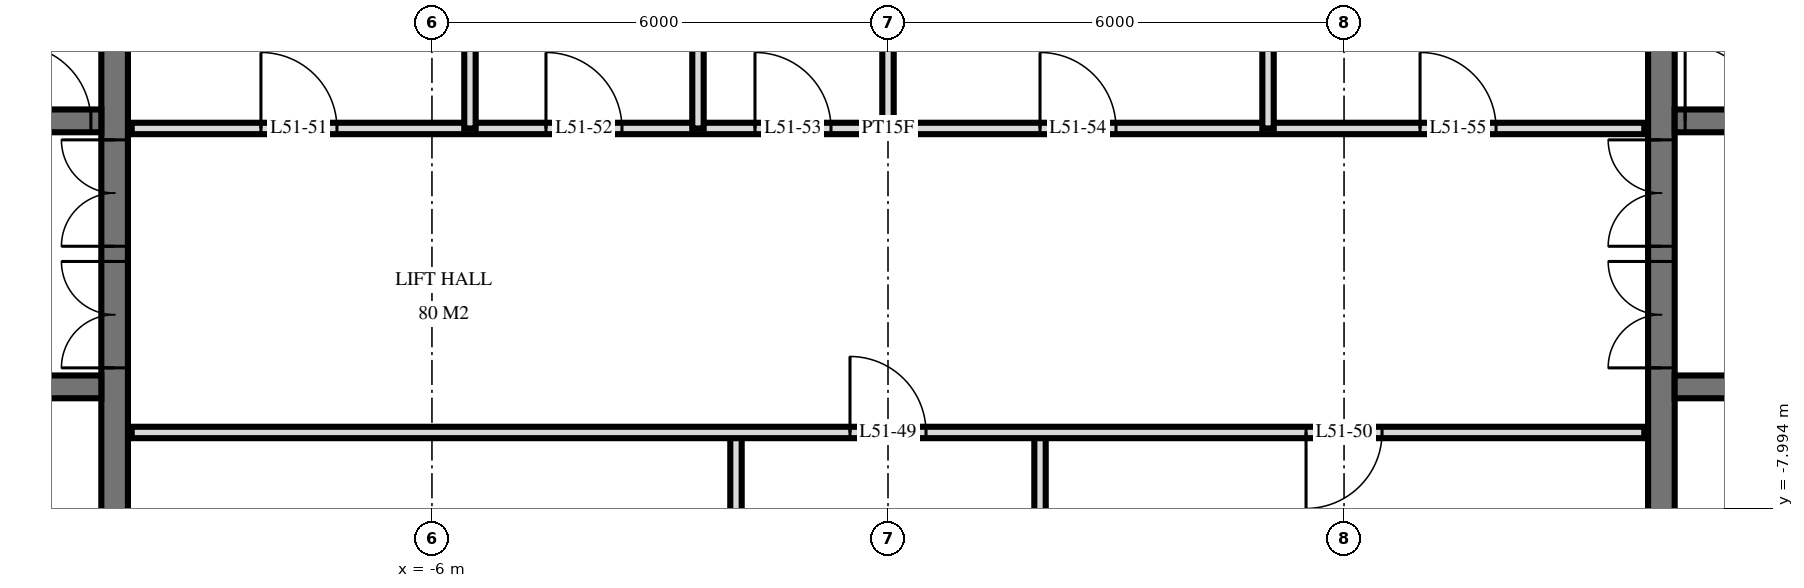
"""IFC4 building model, lengths in metres.
Left out: names, types, materials, properties, quantities, classifications, styles, units other than length and angle.
Written with IfcOpenShell. Run it as: python <this file> out.ifc"""

import sys

from ifc_helpers import new_model, si_unit, direction, frame, frame_2d, origin, place, context, subcontext, project, spatial, rectangle, extrude, element, fill, save


model = new_model("IFC4")
c1 = context("Model", 3, precision=1e-05, world=origin(), true_north=direction((0.0, 1.0)))
c2 = subcontext(c1, "Body", "Model", "MODEL_VIEW")
j1 = project(units=[si_unit("LENGTHUNIT", "METRE"), si_unit("PLANEANGLEUNIT", "RADIAN")], contexts=[c1])
p1 = place(None, origin())
s1 = spatial("IfcSite", under=j1, at=p1, CompositionType="ELEMENT")
p2 = place(p1, origin())
s2 = spatial("IfcBuilding", under=s1, at=p2, CompositionType="ELEMENT")
p3 = place(p2, frame((0.0, 0.0, 197.6)))
s3 = spatial("IfcBuildingStorey", under=s2, at=p3, CompositionType="ELEMENT", Elevation=197.6)
p4 = place(p3, frame((-10.175, -14.55, 0.0), z_axis=(0.0, 0.0, 1.0), x_axis=(0.0, 1.0, 0.0)))
e1 = element("IfcWall", 1, at=p4, inside=s3, PredefinedType="SHEAR", context=c2, shape_type="SweptSolid", body=[
    extrude(rectangle(XDim=14.1, YDim=0.35, at=frame_2d((7.05, 0.0))), origin(), (0.0, 0.0, 1.0), 3.5),
])
p5 = place(p4, frame((8.4, 0.0, 0.0)))
e2 = element("IfcOpeningElement", 2, at=p5, cuts=e1, PredefinedType="OPENING", context=c2, shape_type="SweptSolid", body=[
    extrude(rectangle(XDim=1.4, YDim=2.4, at=frame_2d((0.7, 1.2))), frame((0.0, 0.185, 0.0), z_axis=(0.0, -1.0, 0.0), x_axis=(1.0, 0.0, 0.0)), (0.0, 0.0, 1.0), 0.37),
])
p6 = place(p4, frame((10.0, 0.0, 0.0)))
e3 = element("IfcOpeningElement", 3, at=p6, cuts=e1, PredefinedType="OPENING", context=c2, shape_type="SweptSolid", body=[
    extrude(rectangle(XDim=1.4, YDim=2.4, at=frame_2d((0.7, 1.2))), frame((0.0, 0.185, 0.0), z_axis=(0.0, -1.0, 0.0), x_axis=(1.0, 0.0, 0.0)), (0.0, 0.0, 1.0), 0.37),
])
p7 = place(p4, frame((4.0, 0.0, 0.0)))
e4 = element("IfcOpeningElement", 4, at=p7, cuts=e1, PredefinedType="OPENING", context=c2, shape_type="SweptSolid", body=[
    extrude(rectangle(XDim=1.2, YDim=2.1, at=frame_2d((0.6, 1.05))), frame((0.0, 0.185, 0.0), z_axis=(0.0, -1.0, 0.0), x_axis=(1.0, 0.0, 0.0)), (0.0, 0.0, 1.0), 0.37),
])
p8 = place(p3, frame((-24.05, -2.9, 0.0), z_axis=(0.0, 0.0, 1.0), x_axis=(1.0, 0.0, 0.0)))
e5 = element("IfcWall", 5, at=p8, inside=s3, PredefinedType="SHEAR", context=c2, shape_type="SweptSolid", body=[
    extrude(rectangle(XDim=13.7, YDim=0.3, at=frame_2d((6.85, 0.0))), origin(), (0.0, 0.0, 1.0), 3.5),
])
p9 = place(p8, frame((0.55, 0.0, 0.0)))
e6 = element("IfcOpeningElement", 6, at=p9, cuts=e5, PredefinedType="OPENING", context=c2, shape_type="SweptSolid", body=[
    extrude(rectangle(XDim=1.1, YDim=2.1, at=frame_2d((0.55, 1.05))), frame((0.0, 0.16, 0.0), z_axis=(0.0, -1.0, 0.0), x_axis=(1.0, 0.0, 0.0)), (0.0, 0.0, 1.0), 0.32),
])
p10 = place(p8, frame((6.613, 0.0, 0.0)))
e7 = element("IfcOpeningElement", 7, at=p10, cuts=e5, PredefinedType="OPENING", context=c2, shape_type="SweptSolid", body=[
    extrude(rectangle(XDim=0.9, YDim=2.1, at=frame_2d((0.45, 1.05))), frame((0.0, 0.16, 0.0), z_axis=(0.0, -1.0, 0.0), x_axis=(1.0, 0.0, 0.0)), (0.0, 0.0, 1.0), 0.32),
])
p11 = place(p8, frame((5.188, 0.0, 0.0)))
e8 = element("IfcOpeningElement", 8, at=p11, cuts=e5, PredefinedType="OPENING", context=c2, shape_type="SweptSolid", body=[
    extrude(rectangle(XDim=0.9, YDim=2.1, at=frame_2d((0.45, 1.05))), frame((0.0, 0.16, 0.0), z_axis=(0.0, -1.0, 0.0), x_axis=(1.0, 0.0, 0.0)), (0.0, 0.0, 1.0), 0.32),
])
p12 = place(p8, frame((12.562, 0.0, 0.0)))
e9 = element("IfcOpeningElement", 9, at=p12, cuts=e5, PredefinedType="OPENING", context=c2, shape_type="SweptSolid", body=[
    extrude(rectangle(XDim=1.0, YDim=2.1, at=frame_2d((0.5, 1.05))), frame((0.0, 0.16, 0.0), z_axis=(0.0, -1.0, 0.0), x_axis=(1.0, 0.0, 0.0)), (0.0, 0.0, 1.0), 0.32),
])
p13 = place(p8, frame((11.137, 0.0, 0.0)))
e10 = element("IfcOpeningElement", 10, at=p13, cuts=e5, PredefinedType="OPENING", context=c2, shape_type="SweptSolid", body=[
    extrude(rectangle(XDim=1.0, YDim=2.1, at=frame_2d((0.5, 1.05))), frame((0.0, 0.16, 0.0), z_axis=(0.0, -1.0, 0.0), x_axis=(1.0, 0.0, 0.0)), (0.0, 0.0, 1.0), 0.32),
])
p14 = place(p8, frame((8.85, 0.0, 0.0)))
e11 = element("IfcOpeningElement", 11, at=p14, cuts=e5, PredefinedType="OPENING", context=c2, shape_type="SweptSolid", body=[
    extrude(rectangle(XDim=1.0, YDim=2.1, at=frame_2d((0.5, 1.05))), frame((0.0, 0.16, 0.0), z_axis=(0.0, -1.0, 0.0), x_axis=(1.0, 0.0, 0.0)), (0.0, 0.0, 1.0), 0.32),
])
p15 = place(p8, frame((3.0, 0.0, 0.0)))
e12 = element("IfcOpeningElement", 12, at=p15, cuts=e5, PredefinedType="OPENING", context=c2, shape_type="SweptSolid", body=[
    extrude(rectangle(XDim=1.0, YDim=2.1, at=frame_2d((0.5, 1.05))), frame((0.0, 0.16, 0.0), z_axis=(0.0, -1.0, 0.0), x_axis=(1.0, 0.0, 0.0)), (0.0, 0.0, 1.0), 0.32),
])
p16 = place(p3, frame((-24.05, -6.4, 0.0), z_axis=(0.0, 0.0, 1.0), x_axis=(1.0, 0.0, 0.0)))
e13 = element("IfcWall", 13, at=p16, inside=s3, PredefinedType="SHEAR", context=c2, shape_type="SweptSolid", body=[
    extrude(rectangle(XDim=13.7, YDim=0.3, at=frame_2d((6.85, 0.0))), origin(), (0.0, 0.0, 1.0), 3.5),
])
p17 = place(p16, frame((0.55, 0.0, 0.0)))
e14 = element("IfcOpeningElement", 14, at=p17, cuts=e13, PredefinedType="OPENING", context=c2, shape_type="SweptSolid", body=[
    extrude(rectangle(XDim=1.1, YDim=2.1, at=frame_2d((0.55, 1.05))), frame((0.0, 0.16, 0.0), z_axis=(0.0, -1.0, 0.0), x_axis=(1.0, 0.0, 0.0)), (0.0, 0.0, 1.0), 0.32),
])
p18 = place(p16, frame((5.8, 0.0, 0.0)))
e15 = element("IfcOpeningElement", 15, at=p18, cuts=e13, PredefinedType="OPENING", context=c2, shape_type="SweptSolid", body=[
    extrude(rectangle(XDim=1.1, YDim=2.1, at=frame_2d((0.55, 1.05))), frame((0.0, 0.16, 0.0), z_axis=(0.0, -1.0, 0.0), x_axis=(1.0, 0.0, 0.0)), (0.0, 0.0, 1.0), 0.32),
])
p19 = place(p3, frame((10.175, -14.55, 0.0), z_axis=(0.0, 0.0, 1.0), x_axis=(0.0, 1.0, 0.0)))
e16 = element("IfcWall", 16, at=p19, inside=s3, PredefinedType="SHEAR", context=c2, shape_type="SweptSolid", body=[
    extrude(rectangle(XDim=14.1, YDim=0.35, at=frame_2d((7.05, 0.0))), origin(), (0.0, 0.0, 1.0), 3.5),
])
p20 = place(p19, frame((8.4, 0.0, 0.0)))
e17 = element("IfcOpeningElement", 17, at=p20, cuts=e16, PredefinedType="OPENING", context=c2, shape_type="SweptSolid", body=[
    extrude(rectangle(XDim=1.4, YDim=2.4, at=frame_2d((0.7, 1.2))), frame((0.0, 0.185, 0.0), z_axis=(0.0, -1.0, 0.0), x_axis=(1.0, 0.0, 0.0)), (0.0, 0.0, 1.0), 0.37),
])
p21 = place(p19, frame((10.0, 0.0, 0.0)))
e18 = element("IfcOpeningElement", 18, at=p21, cuts=e16, PredefinedType="OPENING", context=c2, shape_type="SweptSolid", body=[
    extrude(rectangle(XDim=1.4, YDim=2.4, at=frame_2d((0.7, 1.2))), frame((0.0, 0.185, 0.0), z_axis=(0.0, -1.0, 0.0), x_axis=(1.0, 0.0, 0.0)), (0.0, 0.0, 1.0), 0.37),
])
p22 = place(p19, frame((4.0, 0.0, 0.0)))
e19 = element("IfcOpeningElement", 19, at=p22, cuts=e16, PredefinedType="OPENING", context=c2, shape_type="SweptSolid", body=[
    extrude(rectangle(XDim=1.2, YDim=2.1, at=frame_2d((0.6, 1.05))), frame((0.0, 0.185, 0.0), z_axis=(0.0, -1.0, 0.0), x_axis=(1.0, 0.0, 0.0)), (0.0, 0.0, 1.0), 0.37),
])
p23 = place(p3, frame((10.35, -2.9, 0.0), z_axis=(0.0, 0.0, 1.0), x_axis=(1.0, 0.0, 0.0)))
e20 = element("IfcWall", 20, at=p23, inside=s3, PredefinedType="SHEAR", context=c2, shape_type="SweptSolid", body=[
    extrude(rectangle(XDim=13.7, YDim=0.3, at=frame_2d((6.85, 0.0))), origin(), (0.0, 0.0, 1.0), 3.5),
])
p24 = place(p23, frame((12.05, 0.0, 0.0)))
e21 = element("IfcOpeningElement", 21, at=p24, cuts=e20, PredefinedType="OPENING", context=c2, shape_type="SweptSolid", body=[
    extrude(rectangle(XDim=1.1, YDim=2.1, at=frame_2d((0.55, 1.05))), frame((0.0, 0.16, 0.0), z_axis=(0.0, -1.0, 0.0), x_axis=(1.0, 0.0, 0.0)), (0.0, 0.0, 1.0), 0.32),
])
p25 = place(p23, frame((6.188, 0.0, 0.0)))
e22 = element("IfcOpeningElement", 22, at=p25, cuts=e20, PredefinedType="OPENING", context=c2, shape_type="SweptSolid", body=[
    extrude(rectangle(XDim=0.9, YDim=2.1, at=frame_2d((0.45, 1.05))), frame((0.0, 0.16, 0.0), z_axis=(0.0, -1.0, 0.0), x_axis=(1.0, 0.0, 0.0)), (0.0, 0.0, 1.0), 0.32),
])
p26 = place(p23, frame((7.613, 0.0, 0.0)))
e23 = element("IfcOpeningElement", 23, at=p26, cuts=e20, PredefinedType="OPENING", context=c2, shape_type="SweptSolid", body=[
    extrude(rectangle(XDim=0.9, YDim=2.1, at=frame_2d((0.45, 1.05))), frame((0.0, 0.16, 0.0), z_axis=(0.0, -1.0, 0.0), x_axis=(1.0, 0.0, 0.0)), (0.0, 0.0, 1.0), 0.32),
])
p27 = place(p23, frame((0.137, 0.0, 0.0)))
e24 = element("IfcOpeningElement", 24, at=p27, cuts=e20, PredefinedType="OPENING", context=c2, shape_type="SweptSolid", body=[
    extrude(rectangle(XDim=1.0, YDim=2.1, at=frame_2d((0.5, 1.05))), frame((0.0, 0.16, 0.0), z_axis=(0.0, -1.0, 0.0), x_axis=(1.0, 0.0, 0.0)), (0.0, 0.0, 1.0), 0.32),
])
p28 = place(p23, frame((1.562, 0.0, 0.0)))
e25 = element("IfcOpeningElement", 25, at=p28, cuts=e20, PredefinedType="OPENING", context=c2, shape_type="SweptSolid", body=[
    extrude(rectangle(XDim=1.0, YDim=2.1, at=frame_2d((0.5, 1.05))), frame((0.0, 0.16, 0.0), z_axis=(0.0, -1.0, 0.0), x_axis=(1.0, 0.0, 0.0)), (0.0, 0.0, 1.0), 0.32),
])
p29 = place(p23, frame((3.85, 0.0, 0.0)))
e26 = element("IfcOpeningElement", 26, at=p29, cuts=e20, PredefinedType="OPENING", context=c2, shape_type="SweptSolid", body=[
    extrude(rectangle(XDim=1.0, YDim=2.1, at=frame_2d((0.5, 1.05))), frame((0.0, 0.16, 0.0), z_axis=(0.0, -1.0, 0.0), x_axis=(1.0, 0.0, 0.0)), (0.0, 0.0, 1.0), 0.32),
])
p30 = place(p23, frame((9.7, 0.0, 0.0)))
e27 = element("IfcOpeningElement", 27, at=p30, cuts=e20, PredefinedType="OPENING", context=c2, shape_type="SweptSolid", body=[
    extrude(rectangle(XDim=1.0, YDim=2.1, at=frame_2d((0.5, 1.05))), frame((0.0, 0.16, 0.0), z_axis=(0.0, -1.0, 0.0), x_axis=(1.0, 0.0, 0.0)), (0.0, 0.0, 1.0), 0.32),
])
p31 = place(p3, frame((10.35, -6.4, 0.0), z_axis=(0.0, 0.0, 1.0), x_axis=(1.0, 0.0, 0.0)))
e28 = element("IfcWall", 28, at=p31, inside=s3, PredefinedType="SHEAR", context=c2, shape_type="SweptSolid", body=[
    extrude(rectangle(XDim=13.7, YDim=0.3, at=frame_2d((6.85, 0.0))), origin(), (0.0, 0.0, 1.0), 3.5),
])
p32 = place(p31, frame((12.05, 0.0, 0.0)))
e29 = element("IfcOpeningElement", 29, at=p32, cuts=e28, PredefinedType="OPENING", context=c2, shape_type="SweptSolid", body=[
    extrude(rectangle(XDim=1.1, YDim=2.1, at=frame_2d((0.55, 1.05))), frame((0.0, 0.16, 0.0), z_axis=(0.0, -1.0, 0.0), x_axis=(1.0, 0.0, 0.0)), (0.0, 0.0, 1.0), 0.32),
])
p33 = place(p31, frame((6.8, 0.0, 0.0)))
e30 = element("IfcOpeningElement", 30, at=p33, cuts=e28, PredefinedType="OPENING", context=c2, shape_type="SweptSolid", body=[
    extrude(rectangle(XDim=1.1, YDim=2.1, at=frame_2d((0.55, 1.05))), frame((0.0, 0.16, 0.0), z_axis=(0.0, -1.0, 0.0), x_axis=(1.0, 0.0, 0.0)), (0.0, 0.0, 1.0), 0.32),
])
p34 = place(p3, frame((5.0, -3.0, 0.0), z_axis=(0.0, 0.0, 1.0), x_axis=(0.0, 1.0, 0.0)))
e31 = element("IfcWall", 31, at=p34, inside=s3, PredefinedType="PARTITIONING", context=c2, shape_type="SweptSolid", body=[
    extrude(rectangle(XDim=4.02, YDim=0.15, at=frame_2d((2.01, 0.0))), origin(), (0.0, 0.0, 1.0), 3.22),
])
p35 = place(p3, frame((2.0, -11.0, 0.0), z_axis=(0.0, 0.0, 1.0), x_axis=(0.0, 1.0, 0.0)))
e32 = element("IfcWall", 32, at=p35, inside=s3, PredefinedType="PARTITIONING", context=c2, shape_type="SweptSolid", body=[
    extrude(rectangle(XDim=4.0, YDim=0.15, at=frame_2d((2.0, 0.0))), origin(), (0.0, 0.0, 1.0), 3.22),
])
p36 = place(p3, frame((0.0, -3.0, 0.0), z_axis=(0.0, 0.0, 1.0), x_axis=(0.0, 1.0, 0.0)))
e33 = element("IfcWall", 33, at=p36, inside=s3, PredefinedType="PLUMBINGWALL", context=c2, shape_type="SweptSolid", body=[
    extrude(rectangle(XDim=4.02, YDim=0.15, at=frame_2d((2.01, 0.0))), origin(), (0.0, 0.0, 1.0), 3.22),
])
p37 = place(p3, frame((-2.0, -11.0, 0.0), z_axis=(0.0, 0.0, 1.0), x_axis=(0.0, 1.0, 0.0)))
e34 = element("IfcWall", 34, at=p37, inside=s3, PredefinedType="PARTITIONING", context=c2, shape_type="SweptSolid", body=[
    extrude(rectangle(XDim=4.0, YDim=0.15, at=frame_2d((2.0, 0.0))), origin(), (0.0, 0.0, 1.0), 3.22),
])
for number, where, z_axis, x_axis in (
    (35, (-2.5, -3.0, 0.0), (0.0, 0.0, 1.0), (0.0, 1.0, 0.0)),
    (36, (-5.5, -3.0, 0.0), (0.0, 0.0, 1.0), (0.0, 1.0, 0.0)),
):
    element("IfcWall", number, at=place(p3, frame(where, z_axis=z_axis, x_axis=x_axis)), inside=s3, PredefinedType="PLUMBINGWALL", context=c2, shape_type="SweptSolid", body=[
        extrude(rectangle(XDim=4.02, YDim=0.15, at=frame_2d((2.01, 0.0))), origin(), (0.0, 0.0, 1.0), 3.22),
    ])
p38 = place(p3, frame((-9.95, -7.0, 0.0), z_axis=(0.0, 0.0, 1.0), x_axis=(1.0, 0.0, 0.0)))
e37 = element("IfcWall", 37, at=p38, inside=s3, PredefinedType="PARTITIONING", context=c2, shape_type="SweptSolid", body=[
    extrude(rectangle(XDim=19.9, YDim=0.15, at=frame_2d((9.95, 0.0))), origin(), (0.0, 0.0, 1.0), 3.22),
])
p39 = place(p38, frame((9.45, 0.0, 0.0)))
e38 = element("IfcOpeningElement", 38, at=p39, cuts=e37, PredefinedType="OPENING", context=c2, shape_type="SweptSolid", body=[
    extrude(rectangle(XDim=1.0, YDim=2.1, at=frame_2d((0.5, 1.05))), frame((0.0, 0.085, 0.0), z_axis=(0.0, -1.0, 0.0), x_axis=(1.0, 0.0, 0.0)), (0.0, 0.0, 1.0), 0.17),
])
p40 = place(p38, frame((15.45, 0.0, 0.0)))
e39 = element("IfcOpeningElement", 39, at=p40, cuts=e37, PredefinedType="OPENING", context=c2, shape_type="SweptSolid", body=[
    extrude(rectangle(XDim=1.0, YDim=2.1, at=frame_2d((0.5, 1.05))), frame((0.0, 0.085, 0.0), z_axis=(0.0, -1.0, 0.0), x_axis=(1.0, 0.0, 0.0)), (0.0, 0.0, 1.0), 0.17),
])
p41 = place(p3, frame((-9.95, -3.0, 0.0), z_axis=(0.0, 0.0, 1.0), x_axis=(1.0, 0.0, 0.0)))
e40 = element("IfcWall", 40, at=p41, inside=s3, PredefinedType="PARTITIONING", context=c2, shape_type="SweptSolid", body=[
    extrude(rectangle(XDim=19.9, YDim=0.15, at=frame_2d((9.95, 0.0))), origin(), (0.0, 0.0, 1.0), 3.22),
])
p42 = place(p41, frame((1.7, 0.0, 0.0)))
e41 = element("IfcOpeningElement", 41, at=p42, cuts=e40, PredefinedType="OPENING", context=c2, shape_type="SweptSolid", body=[
    extrude(rectangle(XDim=1.0, YDim=2.1, at=frame_2d((0.5, 1.05))), frame((0.0, 0.085, 0.0), z_axis=(0.0, -1.0, 0.0), x_axis=(1.0, 0.0, 0.0)), (0.0, 0.0, 1.0), 0.17),
])
p43 = place(p41, frame((5.45, 0.0, 0.0)))
e42 = element("IfcOpeningElement", 42, at=p43, cuts=e40, PredefinedType="OPENING", context=c2, shape_type="SweptSolid", body=[
    extrude(rectangle(XDim=1.0, YDim=2.1, at=frame_2d((0.5, 1.05))), frame((0.0, 0.085, 0.0), z_axis=(0.0, -1.0, 0.0), x_axis=(1.0, 0.0, 0.0)), (0.0, 0.0, 1.0), 0.17),
])
p44 = place(p41, frame((8.2, 0.0, 0.0)))
e43 = element("IfcOpeningElement", 43, at=p44, cuts=e40, PredefinedType="OPENING", context=c2, shape_type="SweptSolid", body=[
    extrude(rectangle(XDim=1.0, YDim=2.1, at=frame_2d((0.5, 1.05))), frame((0.0, 0.085, 0.0), z_axis=(0.0, -1.0, 0.0), x_axis=(1.0, 0.0, 0.0)), (0.0, 0.0, 1.0), 0.17),
])
p45 = place(p41, frame((11.95, 0.0, 0.0)))
e44 = element("IfcOpeningElement", 44, at=p45, cuts=e40, PredefinedType="OPENING", context=c2, shape_type="SweptSolid", body=[
    extrude(rectangle(XDim=1.0, YDim=2.1, at=frame_2d((0.5, 1.05))), frame((0.0, 0.085, 0.0), z_axis=(0.0, -1.0, 0.0), x_axis=(1.0, 0.0, 0.0)), (0.0, 0.0, 1.0), 0.17),
])
p46 = place(p41, frame((16.95, 0.0, 0.0)))
e45 = element("IfcOpeningElement", 45, at=p46, cuts=e40, PredefinedType="OPENING", context=c2, shape_type="SweptSolid", body=[
    extrude(rectangle(XDim=1.0, YDim=2.1, at=frame_2d((0.5, 1.05))), frame((0.0, 0.085, 0.0), z_axis=(0.0, -1.0, 0.0), x_axis=(1.0, 0.0, 0.0)), (0.0, 0.0, 1.0), 0.17),
])
p47 = place(p5, origin())
e46 = element("IfcDoor", 46, at=p47, inside=s3, OperationType="DOUBLE_DOOR_SINGLE_SWING", PredefinedType="DOOR", context=c2, shape_type="SweptSolid", body=[
    extrude(rectangle(XDim=1.4, YDim=2.4, at=frame_2d((0.7, 1.2))), frame((0.0, 0.025, 0.0), z_axis=(0.0, -1.0, 0.0), x_axis=(1.0, 0.0, 0.0)), (0.0, 0.0, 1.0), 0.05),
])
fill(e2, e46)
p48 = place(p6, origin())
e47 = element("IfcDoor", 47, at=p48, inside=s3, OperationType="DOUBLE_DOOR_SINGLE_SWING", PredefinedType="DOOR", context=c2, shape_type="SweptSolid", body=[
    extrude(rectangle(XDim=1.4, YDim=2.4, at=frame_2d((0.7, 1.2))), frame((0.0, 0.025, 0.0), z_axis=(0.0, -1.0, 0.0), x_axis=(1.0, 0.0, 0.0)), (0.0, 0.0, 1.0), 0.05),
])
fill(e3, e47)
p49 = place(p12, origin())
e48 = element("IfcDoor", 48, at=p49, inside=s3, OperationType="SINGLE_SWING_RIGHT", PredefinedType="DOOR", context=c2, shape_type="SweptSolid", body=[
    extrude(rectangle(XDim=1.0, YDim=2.1, at=frame_2d((0.5, 1.05))), frame((0.0, 0.025, 0.0), z_axis=(0.0, -1.0, 0.0), x_axis=(1.0, 0.0, 0.0)), (0.0, 0.0, 1.0), 0.05),
])
fill(e9, e48)
p50 = place(p20, origin())
e49 = element("IfcDoor", 49, at=p50, inside=s3, OperationType="DOUBLE_DOOR_SINGLE_SWING", PredefinedType="DOOR", context=c2, shape_type="SweptSolid", body=[
    extrude(rectangle(XDim=1.4, YDim=2.4, at=frame_2d((0.7, 1.2))), frame((0.0, 0.025, 0.0), z_axis=(0.0, -1.0, 0.0), x_axis=(1.0, 0.0, 0.0)), (0.0, 0.0, 1.0), 0.05),
])
fill(e17, e49)
p51 = place(p21, origin())
e50 = element("IfcDoor", 50, at=p51, inside=s3, OperationType="DOUBLE_DOOR_SINGLE_SWING", PredefinedType="DOOR", context=c2, shape_type="SweptSolid", body=[
    extrude(rectangle(XDim=1.4, YDim=2.4, at=frame_2d((0.7, 1.2))), frame((0.0, 0.025, 0.0), z_axis=(0.0, -1.0, 0.0), x_axis=(1.0, 0.0, 0.0)), (0.0, 0.0, 1.0), 0.05),
])
fill(e18, e50)
p52 = place(p27, origin())
e51 = element("IfcDoor", 51, at=p52, inside=s3, OperationType="SINGLE_SWING_RIGHT", PredefinedType="DOOR", context=c2, shape_type="SweptSolid", body=[
    extrude(rectangle(XDim=1.0, YDim=2.1, at=frame_2d((0.5, 1.05))), frame((0.0, 0.025, 0.0), z_axis=(0.0, -1.0, 0.0), x_axis=(1.0, 0.0, 0.0)), (0.0, 0.0, 1.0), 0.05),
])
fill(e24, e51)
p53 = place(p39, origin())
e52 = element("IfcDoor", 52, at=p53, inside=s3, OperationType="SINGLE_SWING_RIGHT", PredefinedType="DOOR", context=c2, shape_type="SweptSolid", body=[
    extrude(rectangle(XDim=1.0, YDim=2.1, at=frame_2d((0.5, 1.05))), frame((0.0, 0.025, 0.0), z_axis=(0.0, -1.0, 0.0), x_axis=(1.0, 0.0, 0.0)), (0.0, 0.0, 1.0), 0.05),
])
fill(e38, e52)
p54 = place(p40, frame((0.5, 0.0, 0.0), z_axis=(0.0, 0.0, 1.0), x_axis=(-1.0, 0.0, 0.0)))
e53 = element("IfcDoor", 53, at=p54, inside=s3, OperationType="SINGLE_SWING_LEFT", PredefinedType="DOOR", context=c2, shape_type="SweptSolid", body=[
    extrude(rectangle(XDim=1.0, YDim=2.1, at=frame_2d((0.0, 1.05))), frame((0.0, -0.025, 0.0), z_axis=(0.0, 1.0, 0.0), x_axis=(-1.0, 0.0, 0.0)), (0.0, 0.0, 1.0), 0.05),
])
fill(e39, e53)
p55 = place(p42, origin())
e54 = element("IfcDoor", 54, at=p55, inside=s3, OperationType="SINGLE_SWING_RIGHT", PredefinedType="DOOR", context=c2, shape_type="SweptSolid", body=[
    extrude(rectangle(XDim=1.0, YDim=2.1, at=frame_2d((0.5, 1.05))), frame((0.0, 0.025, 0.0), z_axis=(0.0, -1.0, 0.0), x_axis=(1.0, 0.0, 0.0)), (0.0, 0.0, 1.0), 0.05),
])
fill(e41, e54)
p56 = place(p43, origin())
e55 = element("IfcDoor", 55, at=p56, inside=s3, OperationType="SINGLE_SWING_RIGHT", PredefinedType="DOOR", context=c2, shape_type="SweptSolid", body=[
    extrude(rectangle(XDim=1.0, YDim=2.1, at=frame_2d((0.5, 1.05))), frame((0.0, 0.025, 0.0), z_axis=(0.0, -1.0, 0.0), x_axis=(1.0, 0.0, 0.0)), (0.0, 0.0, 1.0), 0.05),
])
fill(e42, e55)
p57 = place(p44, origin())
e56 = element("IfcDoor", 56, at=p57, inside=s3, OperationType="SINGLE_SWING_RIGHT", PredefinedType="DOOR", context=c2, shape_type="SweptSolid", body=[
    extrude(rectangle(XDim=1.0, YDim=2.1, at=frame_2d((0.5, 1.05))), frame((0.0, 0.025, 0.0), z_axis=(0.0, -1.0, 0.0), x_axis=(1.0, 0.0, 0.0)), (0.0, 0.0, 1.0), 0.05),
])
fill(e43, e56)
p58 = place(p45, origin())
e57 = element("IfcDoor", 57, at=p58, inside=s3, OperationType="SINGLE_SWING_RIGHT", PredefinedType="DOOR", context=c2, shape_type="SweptSolid", body=[
    extrude(rectangle(XDim=1.0, YDim=2.1, at=frame_2d((0.5, 1.05))), frame((0.0, 0.025, 0.0), z_axis=(0.0, -1.0, 0.0), x_axis=(1.0, 0.0, 0.0)), (0.0, 0.0, 1.0), 0.05),
])
fill(e44, e57)
p59 = place(p46, origin())
e58 = element("IfcDoor", 58, at=p59, inside=s3, OperationType="SINGLE_SWING_RIGHT", PredefinedType="DOOR", context=c2, shape_type="SweptSolid", body=[
    extrude(rectangle(XDim=1.0, YDim=2.1, at=frame_2d((0.5, 1.05))), frame((0.0, 0.025, 0.0), z_axis=(0.0, -1.0, 0.0), x_axis=(1.0, 0.0, 0.0)), (0.0, 0.0, 1.0), 0.05),
])
fill(e45, e58)
save(model, sys.argv[1])
